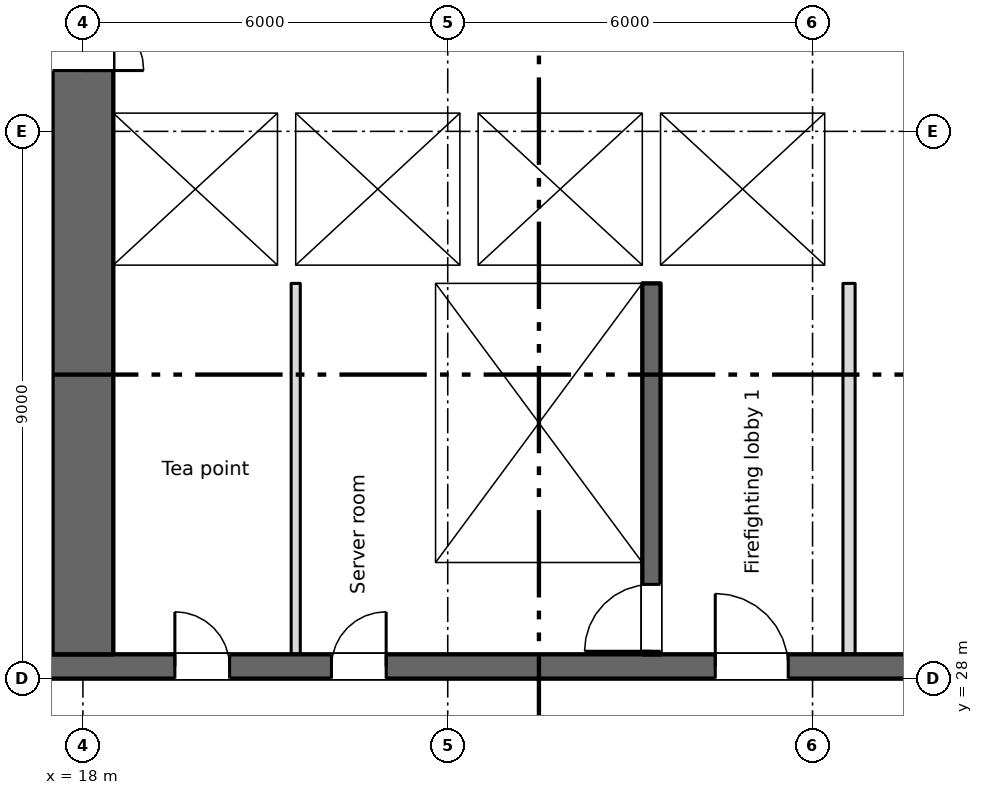
"""IFC4 building model, lengths in metres.
Left out: names, types, materials, properties, quantities, classifications, styles, units other than length and angle.
Written with IfcOpenShell. Run it as: python <this file> out.ifc"""

import sys

from ifc_helpers import new_model, si_unit, direction, frame, frame_2d, origin, place, context, subcontext, project, spatial, rectangle, extrude, element, fill, save


model = new_model("IFC4")
c1 = context("Model", 3, precision=1e-05, world=origin(), true_north=direction((0.0, 1.0)))
c2 = subcontext(c1, "Body", "Model", "MODEL_VIEW")
j1 = project(units=[si_unit("LENGTHUNIT", "METRE"), si_unit("PLANEANGLEUNIT", "RADIAN")], contexts=[c1])
p1 = place(None, origin())
s1 = spatial("IfcSite", under=j1, at=p1, CompositionType="ELEMENT")
p2 = place(p1, origin())
s2 = spatial("IfcBuilding", under=s1, at=p2, CompositionType="ELEMENT")
p3 = place(p2, frame((0.0, 0.0, 41.25)))
s3 = spatial("IfcBuildingStorey", under=s2, at=p3, CompositionType="ELEMENT", Elevation=41.25)
p4 = place(p3, frame((6.7, 28.2, 0.0), z_axis=(0.0, 0.0, 1.0), x_axis=(1.0, 0.0, 0.0)))
e1 = element("IfcWall", 1, at=p4, inside=s3, PredefinedType="SHEAR", context=c2, shape_type="SweptSolid", body=[
    extrude(rectangle(XDim=57.8, YDim=0.4, at=frame_2d((28.9, 0.0))), origin(), (0.0, 0.0, 1.0), 3.35),
])
p5 = place(p4, frame((12.812, 0.0, 0.0)))
e2 = element("IfcOpeningElement", 2, at=p5, cuts=e1, PredefinedType="OPENING", context=c2, shape_type="SweptSolid", body=[
    extrude(rectangle(XDim=0.9, YDim=2.1, at=frame_2d((0.45, 1.05))), frame((0.0, 0.21, 0.0), z_axis=(0.0, -1.0, 0.0), x_axis=(1.0, 0.0, 0.0)), (0.0, 0.0, 1.0), 0.42),
])
p6 = place(p4, frame((15.387, 0.0, 0.0)))
e3 = element("IfcOpeningElement", 3, at=p6, cuts=e1, PredefinedType="OPENING", context=c2, shape_type="SweptSolid", body=[
    extrude(rectangle(XDim=0.9, YDim=2.1, at=frame_2d((0.45, 1.05))), frame((0.0, 0.21, 0.0), z_axis=(0.0, -1.0, 0.0), x_axis=(1.0, 0.0, 0.0)), (0.0, 0.0, 1.0), 0.42),
])
p7 = place(p4, frame((48.312, 0.0, 0.0)))
e4 = element("IfcOpeningElement", 4, at=p7, cuts=e1, PredefinedType="OPENING", context=c2, shape_type="SweptSolid", body=[
    extrude(rectangle(XDim=0.9, YDim=2.1, at=frame_2d((0.45, 1.05))), frame((0.0, 0.21, 0.0), z_axis=(0.0, -1.0, 0.0), x_axis=(1.0, 0.0, 0.0)), (0.0, 0.0, 1.0), 0.42),
])
p8 = place(p4, frame((50.887, 0.0, 0.0)))
e5 = element("IfcOpeningElement", 5, at=p8, cuts=e1, PredefinedType="OPENING", context=c2, shape_type="SweptSolid", body=[
    extrude(rectangle(XDim=0.9, YDim=2.1, at=frame_2d((0.45, 1.05))), frame((0.0, 0.21, 0.0), z_axis=(0.0, -1.0, 0.0), x_axis=(1.0, 0.0, 0.0)), (0.0, 0.0, 1.0), 0.42),
])
p9 = place(p4, frame((0.562, 0.0, 0.0)))
e6 = element("IfcOpeningElement", 6, at=p9, cuts=e1, PredefinedType="OPENING", context=c2, shape_type="SweptSolid", body=[
    extrude(rectangle(XDim=0.9, YDim=2.1, at=frame_2d((0.45, 1.05))), frame((0.0, 0.21, 0.0), z_axis=(0.0, -1.0, 0.0), x_axis=(1.0, 0.0, 0.0)), (0.0, 0.0, 1.0), 0.42),
])
p10 = place(p4, frame((2.137, 0.0, 0.0)))
e7 = element("IfcOpeningElement", 7, at=p10, cuts=e1, PredefinedType="OPENING", context=c2, shape_type="SweptSolid", body=[
    extrude(rectangle(XDim=0.9, YDim=2.1, at=frame_2d((0.45, 1.05))), frame((0.0, 0.21, 0.0), z_axis=(0.0, -1.0, 0.0), x_axis=(1.0, 0.0, 0.0)), (0.0, 0.0, 1.0), 0.42),
])
p11 = place(p4, frame((4.7, 0.0, 0.0)))
e8 = element("IfcOpeningElement", 8, at=p11, cuts=e1, PredefinedType="OPENING", context=c2, shape_type="SweptSolid", body=[
    extrude(rectangle(XDim=1.2, YDim=2.1, at=frame_2d((0.6, 1.05))), frame((0.0, 0.21, 0.0), z_axis=(0.0, -1.0, 0.0), x_axis=(1.0, 0.0, 0.0)), (0.0, 0.0, 1.0), 0.42),
])
p12 = place(p4, frame((31.7, 0.0, 0.0)))
e9 = element("IfcOpeningElement", 9, at=p12, cuts=e1, PredefinedType="OPENING", context=c2, shape_type="SweptSolid", body=[
    extrude(rectangle(XDim=1.2, YDim=2.1, at=frame_2d((0.6, 1.05))), frame((0.0, 0.21, 0.0), z_axis=(0.0, -1.0, 0.0), x_axis=(1.0, 0.0, 0.0)), (0.0, 0.0, 1.0), 0.42),
])
p13 = place(p4, frame((55.2, 0.0, 0.0)))
e10 = element("IfcOpeningElement", 10, at=p13, cuts=e1, PredefinedType="OPENING", context=c2, shape_type="SweptSolid", body=[
    extrude(rectangle(XDim=1.2, YDim=2.1, at=frame_2d((0.6, 1.05))), frame((0.0, 0.21, 0.0), z_axis=(0.0, -1.0, 0.0), x_axis=(1.0, 0.0, 0.0)), (0.0, 0.0, 1.0), 0.42),
])
p14 = place(p4, frame((21.7, 0.0, 0.0)))
e11 = element("IfcOpeningElement", 11, at=p14, cuts=e1, PredefinedType="OPENING", context=c2, shape_type="SweptSolid", body=[
    extrude(rectangle(XDim=1.2, YDim=2.1, at=frame_2d((0.6, 1.05))), frame((0.0, 0.21, 0.0), z_axis=(0.0, -1.0, 0.0), x_axis=(1.0, 0.0, 0.0)), (0.0, 0.0, 1.0), 0.42),
])
p15 = place(p4, frame((41.7, 0.0, 0.0)))
e12 = element("IfcOpeningElement", 12, at=p15, cuts=e1, PredefinedType="OPENING", context=c2, shape_type="SweptSolid", body=[
    extrude(rectangle(XDim=1.2, YDim=2.1, at=frame_2d((0.6, 1.05))), frame((0.0, 0.21, 0.0), z_axis=(0.0, -1.0, 0.0), x_axis=(1.0, 0.0, 0.0)), (0.0, 0.0, 1.0), 0.42),
])
p16 = place(p4, frame((24.85, 0.0, 0.0)))
e13 = element("IfcOpeningElement", 13, at=p16, cuts=e1, PredefinedType="OPENING", context=c2, shape_type="SweptSolid", body=[
    extrude(rectangle(XDim=2.4, YDim=2.1, at=frame_2d((1.2, 1.05))), frame((0.0, 0.21, 0.0), z_axis=(0.0, -1.0, 0.0), x_axis=(1.0, 0.0, 0.0)), (0.0, 0.0, 1.0), 0.42),
])
p17 = place(p4, frame((37.35, 0.0, 0.0)))
e14 = element("IfcOpeningElement", 14, at=p17, cuts=e1, PredefinedType="OPENING", context=c2, shape_type="SweptSolid", body=[
    extrude(rectangle(XDim=2.4, YDim=2.1, at=frame_2d((1.2, 1.05))), frame((0.0, 0.21, 0.0), z_axis=(0.0, -1.0, 0.0), x_axis=(1.0, 0.0, 0.0)), (0.0, 0.0, 1.0), 0.42),
])
p18 = place(p4, frame((7.85, 0.0, 0.0)))
e15 = element("IfcOpeningElement", 15, at=p18, cuts=e1, PredefinedType="OPENING", context=c2, shape_type="SweptSolid", body=[
    extrude(rectangle(XDim=2.4, YDim=2.1, at=frame_2d((1.2, 1.05))), frame((0.0, 0.21, 0.0), z_axis=(0.0, -1.0, 0.0), x_axis=(1.0, 0.0, 0.0)), (0.0, 0.0, 1.0), 0.42),
])
p19 = place(p4, frame((28.85, 0.0, 0.0)))
e16 = element("IfcOpeningElement", 16, at=p19, cuts=e1, PredefinedType="OPENING", context=c2, shape_type="SweptSolid", body=[
    extrude(rectangle(XDim=0.9, YDim=2.1, at=frame_2d((0.45, 1.05))), frame((0.0, 0.21, 0.0), z_axis=(0.0, -1.0, 0.0), x_axis=(1.0, 0.0, 0.0)), (0.0, 0.0, 1.0), 0.42),
])
p20 = place(p4, frame((34.85, 0.0, 0.0)))
e17 = element("IfcOpeningElement", 17, at=p20, cuts=e1, PredefinedType="OPENING", context=c2, shape_type="SweptSolid", body=[
    extrude(rectangle(XDim=0.9, YDim=2.1, at=frame_2d((0.45, 1.05))), frame((0.0, 0.21, 0.0), z_axis=(0.0, -1.0, 0.0), x_axis=(1.0, 0.0, 0.0)), (0.0, 0.0, 1.0), 0.42),
])
p21 = place(p3, frame((18.0, 28.4, 0.0), z_axis=(0.0, 0.0, 1.0), x_axis=(0.0, 1.0, 0.0)))
e18 = element("IfcWall", 18, at=p21, inside=s3, PredefinedType="SHEAR", context=c2, shape_type="SweptSolid", body=[
    extrude(rectangle(XDim=16.6, YDim=1.0, at=frame_2d((8.3, 0.0))), origin(), (0.0, 0.0, 1.0), 3.35),
])
p22 = place(p21, frame((9.6, 0.0, 0.0)))
e19 = element("IfcOpeningElement", 19, at=p22, cuts=e18, PredefinedType="OPENING", context=c2, shape_type="SweptSolid", body=[
    extrude(rectangle(XDim=2.0, YDim=2.1, at=frame_2d((1.0, 1.05))), frame((0.0, 0.51, 0.0), z_axis=(0.0, -1.0, 0.0), x_axis=(1.0, 0.0, 0.0)), (0.0, 0.0, 1.0), 1.02),
])
p23 = place(p21, frame((15.25, 0.0, 0.0)))
e20 = element("IfcOpeningElement", 20, at=p23, cuts=e18, PredefinedType="OPENING", context=c2, shape_type="SweptSolid", body=[
    extrude(rectangle(XDim=1.2, YDim=2.1, at=frame_2d((0.6, 1.05))), frame((0.0, 0.51, 0.0), z_axis=(0.0, -1.0, 0.0), x_axis=(1.0, 0.0, 0.0)), (0.0, 0.0, 1.0), 1.02),
])
p24 = place(p3, frame((23.65, 28.4, 0.0), z_axis=(0.0, 0.0, 1.0), x_axis=(0.0, 1.0, 0.0)))
e21 = element("IfcWall", 21, at=p24, inside=s3, PredefinedType="SHEAR", context=c2, shape_type="SweptSolid", body=[
    extrude(rectangle(XDim=6.1, YDim=0.3, at=frame_2d((3.05, 0.0))), origin(), (0.0, 0.0, 1.0), 3.35),
])
p25 = place(p3, frame((27.35, 28.4, 0.0), z_axis=(0.0, 0.0, 1.0), x_axis=(0.0, 1.0, 0.0)))
e22 = element("IfcWall", 22, at=p25, inside=s3, PredefinedType="SHEAR", context=c2, shape_type="SweptSolid", body=[
    extrude(rectangle(XDim=6.1, YDim=0.3, at=frame_2d((3.05, 0.0))), origin(), (0.0, 0.0, 1.0), 3.35),
])
p26 = place(p25, frame((0.05, 0.0, 0.0)))
e23 = element("IfcOpeningElement", 23, at=p26, cuts=e22, PredefinedType="OPENING", context=c2, shape_type="SweptSolid", body=[
    extrude(rectangle(XDim=1.1, YDim=2.1, at=frame_2d((0.55, 1.05))), frame((0.0, 0.16, 0.0), z_axis=(0.0, -1.0, 0.0), x_axis=(1.0, 0.0, 0.0)), (0.0, 0.0, 1.0), 0.32),
])
p27 = place(p3, frame((18.5, 34.65, 0.0), z_axis=(0.0, 0.0, 1.0), x_axis=(1.0, 0.0, 0.0)))
e24 = element("IfcWall", 24, at=p27, inside=s3, PredefinedType="SHEAR", context=c2, shape_type="SweptSolid", body=[
    extrude(rectangle(XDim=12.2, YDim=0.3, at=frame_2d((6.1, 0.0))), origin(), (0.0, 0.0, 1.0), 3.35),
])
p28 = place(p27, frame((9.8, 0.0, 0.0)))
e25 = element("IfcOpeningElement", 25, at=p28, cuts=e24, PredefinedType="OPENING", context=c2, shape_type="SweptSolid", body=[
    extrude(rectangle(XDim=1.1, YDim=2.1, at=frame_2d((0.55, 1.05))), frame((0.0, 0.16, 0.0), z_axis=(0.0, -1.0, 0.0), x_axis=(1.0, 0.0, 0.0)), (0.0, 0.0, 1.0), 0.32),
])
p29 = place(p3, frame((18.5, 37.45, 0.0), z_axis=(0.0, 0.0, 1.0), x_axis=(1.0, 0.0, 0.0)))
e26 = element("IfcWall", 26, at=p29, inside=s3, PredefinedType="SHEAR", context=c2, shape_type="SweptSolid", body=[
    extrude(rectangle(XDim=12.2, YDim=0.3, at=frame_2d((6.1, 0.0))), origin(), (0.0, 0.0, 1.0), 3.35),
])
p30 = place(p29, frame((0.8, 0.0, 0.0)))
e27 = element("IfcOpeningElement", 27, at=p30, cuts=e26, PredefinedType="OPENING", context=c2, shape_type="SweptSolid", body=[
    extrude(rectangle(XDim=1.1, YDim=2.1, at=frame_2d((0.55, 1.05))), frame((0.0, 0.16, 0.0), z_axis=(0.0, -1.0, 0.0), x_axis=(1.0, 0.0, 0.0)), (0.0, 0.0, 1.0), 0.32),
])
p31 = place(p29, frame((3.8, 0.0, 0.0)))
e28 = element("IfcOpeningElement", 28, at=p31, cuts=e26, PredefinedType="OPENING", context=c2, shape_type="SweptSolid", body=[
    extrude(rectangle(XDim=1.1, YDim=2.1, at=frame_2d((0.55, 1.05))), frame((0.0, 0.16, 0.0), z_axis=(0.0, -1.0, 0.0), x_axis=(1.0, 0.0, 0.0)), (0.0, 0.0, 1.0), 0.32),
])
p32 = place(p29, frame((6.8, 0.0, 0.0)))
e29 = element("IfcOpeningElement", 29, at=p32, cuts=e26, PredefinedType="OPENING", context=c2, shape_type="SweptSolid", body=[
    extrude(rectangle(XDim=1.1, YDim=2.1, at=frame_2d((0.55, 1.05))), frame((0.0, 0.16, 0.0), z_axis=(0.0, -1.0, 0.0), x_axis=(1.0, 0.0, 0.0)), (0.0, 0.0, 1.0), 0.32),
])
p33 = place(p3, frame((27.35, 34.8, 0.0), z_axis=(0.0, 0.0, 1.0), x_axis=(0.0, 1.0, 0.0)))
e30 = element("IfcWall", 30, at=p33, inside=s3, PredefinedType="SHEAR", context=c2, shape_type="SweptSolid", body=[
    extrude(rectangle(XDim=2.5, YDim=0.3, at=frame_2d((1.25, 0.0))), origin(), (0.0, 0.0, 1.0), 3.35),
])
p34 = place(p3, frame((30.45, 34.8, 0.0), z_axis=(0.0, 0.0, 1.0), x_axis=(0.0, 1.0, 0.0)))
e31 = element("IfcWall", 31, at=p34, inside=s3, PredefinedType="SHEAR", context=c2, shape_type="SweptSolid", body=[
    extrude(rectangle(XDim=2.5, YDim=0.5, at=frame_2d((1.25, 0.0))), origin(), (0.0, 0.0, 1.0), 3.35),
])
for number, where, z_axis, x_axis in (
    (32, (21.35, 34.8, 0.0), (0.0, 0.0, 1.0), (0.0, 1.0, 0.0)),
    (33, (24.35, 34.8, 0.0), (0.0, 0.0, 1.0), (0.0, 1.0, 0.0)),
):
    element("IfcWall", number, at=place(p3, frame(where, z_axis=z_axis, x_axis=x_axis)), inside=s3, PredefinedType="SHEAR", context=c2, shape_type="SweptSolid", body=[
        extrude(rectangle(XDim=2.5, YDim=0.3, at=frame_2d((1.25, 0.0))), origin(), (0.0, 0.0, 1.0), 3.35),
    ])
p35 = place(p3, frame((30.6, 28.4, 0.0), z_axis=(0.0, 0.0, 1.0), x_axis=(0.0, 1.0, 0.0)))
e34 = element("IfcWall", 34, at=p35, inside=s3, PredefinedType="PARTITIONING", context=c2, shape_type="SweptSolid", body=[
    extrude(rectangle(XDim=6.1, YDim=0.2, at=frame_2d((3.05, 0.0))), origin(), (0.0, 0.0, 1.0), 3.35),
])
p36 = place(p3, frame((21.5, 28.4, 0.0), z_axis=(0.0, 0.0, 1.0), x_axis=(0.0, 1.0, 0.0)))
e35 = element("IfcWall", 35, at=p36, inside=s3, PredefinedType="PARTITIONING", context=c2, shape_type="SweptSolid", body=[
    extrude(rectangle(XDim=6.1, YDim=0.15, at=frame_2d((3.05, 0.0))), origin(), (0.0, 0.0, 1.0), 3.35),
])
p37 = place(p5, origin())
e36 = element("IfcDoor", 36, at=p37, inside=s3, OperationType="SINGLE_SWING_LEFT", PredefinedType="DOOR", context=c2, shape_type="SweptSolid", body=[
    extrude(rectangle(XDim=0.9, YDim=2.1, at=frame_2d((0.45, 1.05))), frame((0.0, 0.025, 0.0), z_axis=(0.0, -1.0, 0.0), x_axis=(1.0, 0.0, 0.0)), (0.0, 0.0, 1.0), 0.05),
])
fill(e2, e36)
p38 = place(p6, origin())
e37 = element("IfcDoor", 37, at=p38, inside=s3, OperationType="SINGLE_SWING_RIGHT", PredefinedType="DOOR", context=c2, shape_type="SweptSolid", body=[
    extrude(rectangle(XDim=0.9, YDim=2.1, at=frame_2d((0.45, 1.05))), frame((0.0, 0.025, 0.0), z_axis=(0.0, -1.0, 0.0), x_axis=(1.0, 0.0, 0.0)), (0.0, 0.0, 1.0), 0.05),
])
fill(e3, e37)
p39 = place(p30, origin())
e38 = element("IfcDoor", 38, at=p39, inside=s3, OperationType="SLIDING_TO_LEFT", PredefinedType="DOOR", context=c2, shape_type="SweptSolid", body=[
    extrude(rectangle(XDim=1.1, YDim=2.1, at=frame_2d((0.55, 1.05))), frame((0.0, 0.025, 0.0), z_axis=(0.0, -1.0, 0.0), x_axis=(1.0, 0.0, 0.0)), (0.0, 0.0, 1.0), 0.05),
])
fill(e27, e38)
p40 = place(p31, origin())
e39 = element("IfcDoor", 39, at=p40, inside=s3, OperationType="SLIDING_TO_LEFT", PredefinedType="DOOR", context=c2, shape_type="SweptSolid", body=[
    extrude(rectangle(XDim=1.1, YDim=2.1, at=frame_2d((0.55, 1.05))), frame((0.0, 0.025, 0.0), z_axis=(0.0, -1.0, 0.0), x_axis=(1.0, 0.0, 0.0)), (0.0, 0.0, 1.0), 0.05),
])
fill(e28, e39)
p41 = place(p32, origin())
e40 = element("IfcDoor", 40, at=p41, inside=s3, OperationType="SLIDING_TO_LEFT", PredefinedType="DOOR", context=c2, shape_type="SweptSolid", body=[
    extrude(rectangle(XDim=1.1, YDim=2.1, at=frame_2d((0.55, 1.05))), frame((0.0, 0.025, 0.0), z_axis=(0.0, -1.0, 0.0), x_axis=(1.0, 0.0, 0.0)), (0.0, 0.0, 1.0), 0.05),
])
fill(e29, e40)
p42 = place(p28, origin())
e41 = element("IfcDoor", 41, at=p42, inside=s3, OperationType="SLIDING_TO_LEFT", PredefinedType="DOOR", context=c2, shape_type="SweptSolid", body=[
    extrude(rectangle(XDim=1.1, YDim=2.1, at=frame_2d((0.55, 1.05))), frame((0.0, 0.025, 0.0), z_axis=(0.0, -1.0, 0.0), x_axis=(1.0, 0.0, 0.0)), (0.0, 0.0, 1.0), 0.05),
])
fill(e25, e41)
p43 = place(p26, origin())
e42 = element("IfcDoor", 42, at=p43, inside=s3, OperationType="SINGLE_SWING_LEFT", PredefinedType="DOOR", context=c2, shape_type="SweptSolid", body=[
    extrude(rectangle(XDim=1.1, YDim=2.1, at=frame_2d((0.55, 1.05))), frame((0.0, 0.025, 0.0), z_axis=(0.0, -1.0, 0.0), x_axis=(1.0, 0.0, 0.0)), (0.0, 0.0, 1.0), 0.05),
])
fill(e23, e42)
p44 = place(p14, origin())
e43 = element("IfcDoor", 43, at=p44, inside=s3, OperationType="SINGLE_SWING_LEFT", PredefinedType="DOOR", context=c2, shape_type="SweptSolid", body=[
    extrude(rectangle(XDim=1.2, YDim=2.1, at=frame_2d((0.6, 1.05))), frame((0.0, 0.025, 0.0), z_axis=(0.0, -1.0, 0.0), x_axis=(1.0, 0.0, 0.0)), (0.0, 0.0, 1.0), 0.05),
])
fill(e11, e43)
p45 = place(p22, origin())
e44 = element("IfcDoor", 44, at=p45, inside=s3, OperationType="DOUBLE_DOOR_SINGLE_SWING", PredefinedType="DOOR", context=c2, shape_type="SweptSolid", body=[
    extrude(rectangle(XDim=2.0, YDim=2.1, at=frame_2d((1.0, 1.05))), frame((0.0, 0.025, 0.0), z_axis=(0.0, -1.0, 0.0), x_axis=(1.0, 0.0, 0.0)), (0.0, 0.0, 1.0), 0.05),
])
fill(e19, e44)
save(model, sys.argv[1])
